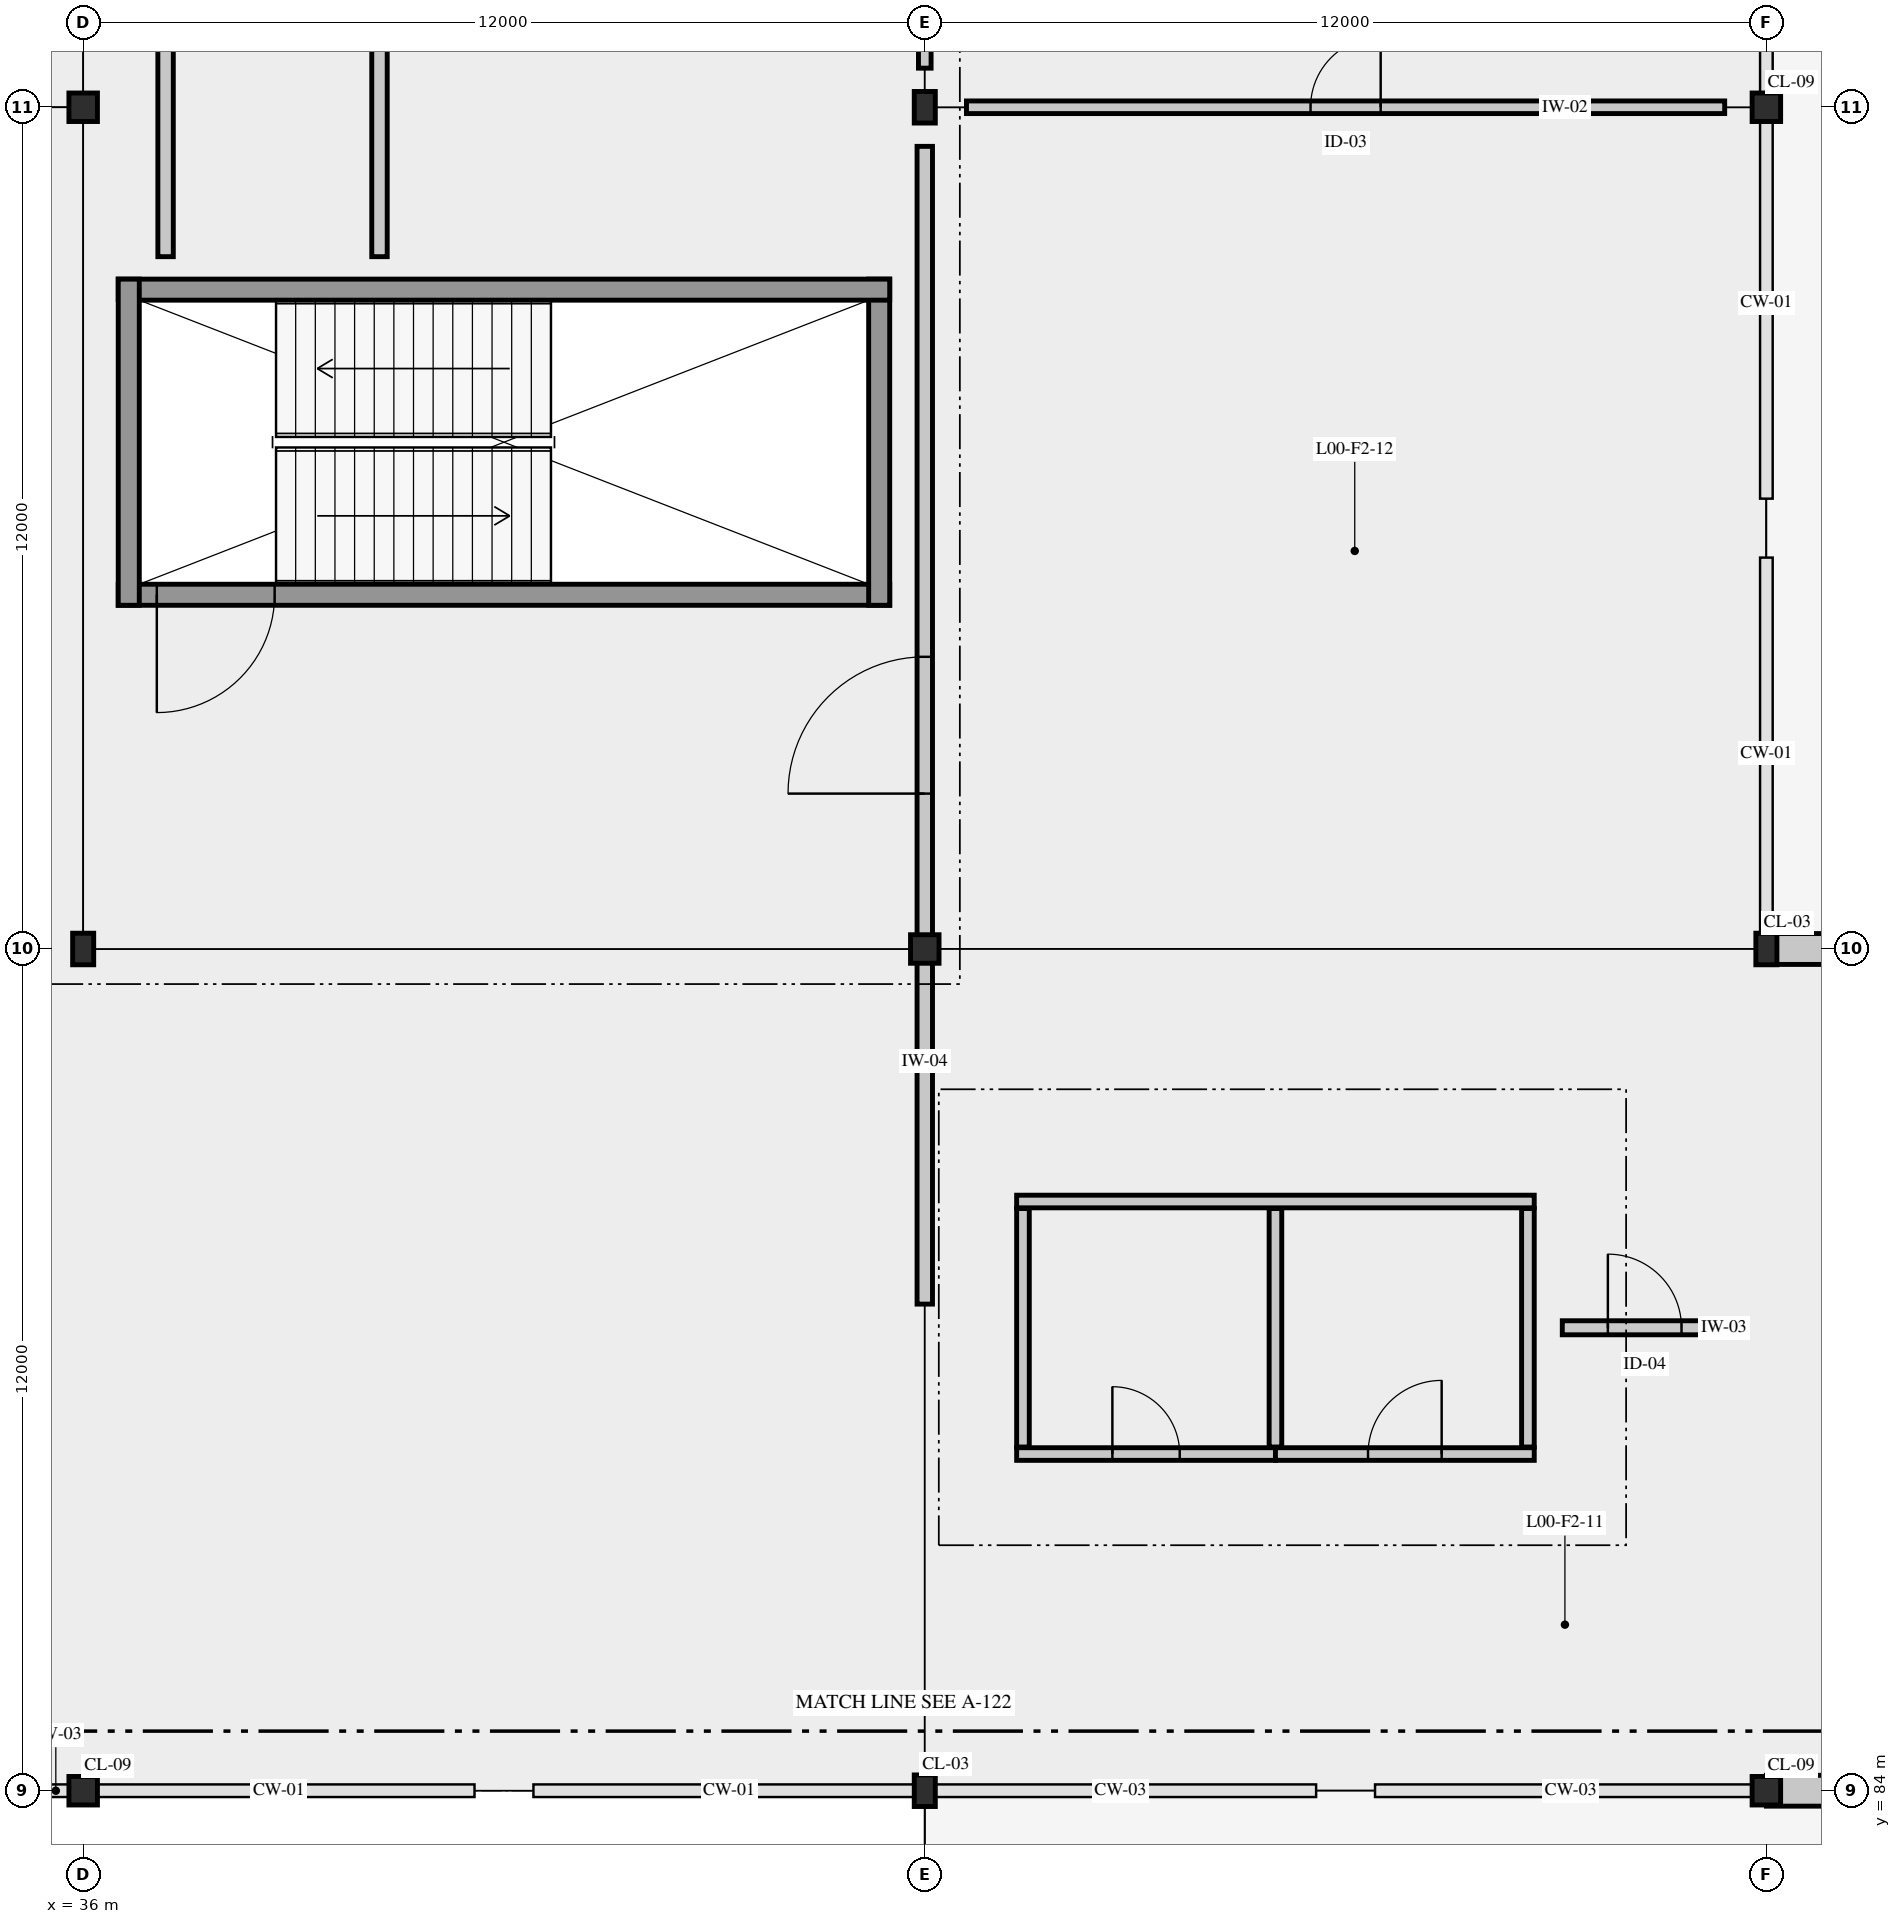
"""IFC4 building model, lengths in metres.
Left out: names, types, materials, properties, quantities, classifications, styles, units other than length and angle.
Written with IfcOpenShell. Run it as: python <this file> out.ifc"""

import sys

from ifc_helpers import new_model, si_unit, direction, frame, frame_2d, origin, origin_2d, place, context, subcontext, project, spatial, rectangle, hollow_circle, i_section, extrude, element, fill, save


model = new_model("IFC4")
c1 = context("Model", 3, precision=1e-05, world=origin(), true_north=direction((0.0, 1.0)))
c2 = subcontext(c1, "Body", "Model", "MODEL_VIEW")
j1 = project(units=[si_unit("LENGTHUNIT", "METRE"), si_unit("PLANEANGLEUNIT", "RADIAN")], contexts=[c1])
p1 = place(None, origin())
s1 = spatial("IfcSite", under=j1, at=p1, CompositionType="ELEMENT")
p2 = place(p1, origin())
s2 = spatial("IfcBuilding", under=s1, at=p2, CompositionType="ELEMENT")
p3 = place(p2, origin())
s3 = spatial("IfcBuildingStorey", under=s2, at=p3, CompositionType="ELEMENT", Elevation=0.0)
p4 = place(p3, frame((36.0, 84.0, 0.0), z_axis=(0.0, 0.0, 1.0), x_axis=(1.0, 0.0, 0.0)))
e1 = element("IfcColumn", 1, at=p4, inside=s3, PredefinedType="COLUMN", context=c2, shape_type="SweptSolid", body=[
    extrude(hollow_circle(Radius=0.203, WallThickness=0.016, at=origin_2d()), origin(), (0.0, 0.0, 1.0), 5.4),
])
p5 = place(p3, frame((36.0, 96.0, 0.0), z_axis=(0.0, 0.0, 1.0), x_axis=(1.0, 0.0, 0.0)))
e2 = element("IfcColumn", 2, at=p5, inside=s3, PredefinedType="COLUMN", context=c2, shape_type="SweptSolid", body=[
    extrude(i_section(OverallWidth=0.3, OverallDepth=0.45, WebThickness=0.014, FlangeThickness=0.026, FilletRadius=0.027, at=origin_2d()), origin(), (0.0, 0.0, 1.0), 5.4),
])
p6 = place(p3, frame((36.0, 108.0, 0.0), z_axis=(0.0, 0.0, 1.0), x_axis=(1.0, 0.0, 0.0)))
e3 = element("IfcColumn", 3, at=p6, inside=s3, PredefinedType="COLUMN", context=c2, shape_type="SweptSolid", body=[
    extrude(hollow_circle(Radius=0.203, WallThickness=0.016, at=origin_2d()), origin(), (0.0, 0.0, 1.0), 5.4),
])
p7 = place(p3, frame((48.0, 84.0, 0.0), z_axis=(0.0, 0.0, 1.0), x_axis=(1.0, 0.0, 0.0)))
e4 = element("IfcColumn", 4, at=p7, inside=s3, PredefinedType="COLUMN", context=c2, shape_type="SweptSolid", body=[
    extrude(i_section(OverallWidth=0.3, OverallDepth=0.45, WebThickness=0.014, FlangeThickness=0.026, FilletRadius=0.027, at=origin_2d()), origin(), (0.0, 0.0, 1.0), 5.4),
])
p8 = place(p3, frame((48.0, 96.0, 0.0), z_axis=(0.0, 0.0, 1.0), x_axis=(1.0, 0.0, 0.0)))
e5 = element("IfcColumn", 5, at=p8, inside=s3, PredefinedType="COLUMN", context=c2, shape_type="SweptSolid", body=[
    extrude(hollow_circle(Radius=0.203, WallThickness=0.016, at=origin_2d()), origin(), (0.0, 0.0, 1.0), 5.4),
])
p9 = place(p3, frame((48.0, 108.0, 0.0), z_axis=(0.0, 0.0, 1.0), x_axis=(1.0, 0.0, 0.0)))
e6 = element("IfcColumn", 6, at=p9, inside=s3, PredefinedType="COLUMN", context=c2, shape_type="SweptSolid", body=[
    extrude(i_section(OverallWidth=0.3, OverallDepth=0.45, WebThickness=0.014, FlangeThickness=0.026, FilletRadius=0.027, at=origin_2d()), origin(), (0.0, 0.0, 1.0), 5.4),
])
p10 = place(p3, frame((60.0, 84.0, 0.0), z_axis=(0.0, 0.0, 1.0), x_axis=(1.0, 0.0, 0.0)))
e7 = element("IfcColumn", 7, at=p10, inside=s3, PredefinedType="COLUMN", context=c2, shape_type="SweptSolid", body=[
    extrude(hollow_circle(Radius=0.203, WallThickness=0.016, at=origin_2d()), origin(), (0.0, 0.0, 1.0), 5.4),
])
p11 = place(p3, frame((60.0, 96.0, 0.0), z_axis=(0.0, 0.0, 1.0), x_axis=(1.0, 0.0, 0.0)))
e8 = element("IfcColumn", 8, at=p11, inside=s3, PredefinedType="COLUMN", context=c2, shape_type="SweptSolid", body=[
    extrude(i_section(OverallWidth=0.3, OverallDepth=0.45, WebThickness=0.014, FlangeThickness=0.026, FilletRadius=0.027, at=origin_2d()), origin(), (0.0, 0.0, 1.0), 5.4),
])
p12 = place(p3, frame((60.0, 108.0, 0.0), z_axis=(0.0, 0.0, 1.0), x_axis=(1.0, 0.0, 0.0)))
e9 = element("IfcColumn", 9, at=p12, inside=s3, PredefinedType="COLUMN", context=c2, shape_type="SweptSolid", body=[
    extrude(hollow_circle(Radius=0.203, WallThickness=0.016, at=origin_2d()), origin(), (0.0, 0.0, 1.0), 5.4),
])
p13 = place(p3, frame((60.0, 84.0, 0.0), z_axis=(0.0, 0.0, 1.0), x_axis=(1.0, 0.0, 0.0)))
e10 = element("IfcWall", 10, at=p13, inside=s3, PredefinedType="SOLIDWALL", context=c2, shape_type="SweptSolid", body=[
    extrude(rectangle(XDim=12.0, YDim=0.44, at=frame_2d((6.0, 0.0))), origin(), (0.0, 0.0, 1.0), 4.52),
])
p14 = place(p13, frame((1.96, 0.0, 0.0)))
e11 = element("IfcOpeningElement", 11, at=p14, cuts=e10, PredefinedType="OPENING", context=c2, shape_type="SweptSolid", body=[
    extrude(rectangle(XDim=2.8, YDim=2.8, at=frame_2d((1.4, 1.4))), frame((0.0, 0.23, 0.0), z_axis=(0.0, -1.0, 0.0), x_axis=(1.0, 0.0, 0.0)), (0.0, 0.0, 1.0), 0.46),
])
p15 = place(p13, frame((7.44, 0.0, 0.0)))
e12 = element("IfcOpeningElement", 12, at=p15, cuts=e10, PredefinedType="OPENING", context=c2, shape_type="SweptSolid", body=[
    extrude(rectangle(XDim=2.4, YDim=2.6, at=frame_2d((1.2, 1.3))), frame((0.0, 0.23, 0.0), z_axis=(0.0, -1.0, 0.0), x_axis=(1.0, 0.0, 0.0)), (0.0, 0.0, 1.0), 0.46),
])
p16 = place(p3, frame((72.0, 96.0, 0.0), z_axis=(0.0, 0.0, 1.0), x_axis=(-1.0, 0.0, 0.0)))
e13 = element("IfcWall", 13, at=p16, inside=s3, PredefinedType="SOLIDWALL", context=c2, shape_type="SweptSolid", body=[
    extrude(rectangle(XDim=12.0, YDim=0.44, at=frame_2d((6.0, 0.0))), origin(), (0.0, 0.0, 1.0), 4.52),
])
p17 = place(p16, frame((1.96, 0.0, 0.0)))
e14 = element("IfcOpeningElement", 14, at=p17, cuts=e13, PredefinedType="OPENING", context=c2, shape_type="SweptSolid", body=[
    extrude(rectangle(XDim=2.8, YDim=2.8, at=frame_2d((1.4, 1.4))), frame((0.0, 0.23, 0.0), z_axis=(0.0, -1.0, 0.0), x_axis=(1.0, 0.0, 0.0)), (0.0, 0.0, 1.0), 0.46),
])
p18 = place(p16, frame((7.44, 0.0, 0.0)))
e15 = element("IfcOpeningElement", 15, at=p18, cuts=e13, PredefinedType="OPENING", context=c2, shape_type="SweptSolid", body=[
    extrude(rectangle(XDim=2.4, YDim=2.6, at=frame_2d((1.2, 1.3))), frame((0.0, 0.23, 0.0), z_axis=(0.0, -1.0, 0.0), x_axis=(1.0, 0.0, 0.0)), (0.0, 0.0, 1.0), 0.46),
])
p19 = place(p3, frame((36.5, 101.05, 0.0), z_axis=(0.0, 0.0, 1.0), x_axis=(1.0, 0.0, 0.0)))
e16 = element("IfcWall", 16, at=p19, inside=s3, PredefinedType="SHEAR", context=c2, shape_type="SweptSolid", body=[
    extrude(rectangle(XDim=11.0, YDim=0.3, at=frame_2d((5.5, 0.0))), origin(), (0.0, 0.0, 1.0), 5.14),
])
p20 = place(p19, frame((0.55, 0.0, 0.0)))
e17 = element("IfcOpeningElement", 17, at=p20, cuts=e16, PredefinedType="OPENING", context=c2, shape_type="SweptSolid", body=[
    extrude(rectangle(XDim=1.68, YDim=2.35, at=frame_2d((0.84, 1.175))), frame((0.0, 0.16, 0.0), z_axis=(0.0, -1.0, 0.0), x_axis=(1.0, 0.0, 0.0)), (0.0, 0.0, 1.0), 0.32),
])
p21 = place(p3, frame((47.35, 100.9, 0.0), z_axis=(0.0, 0.0, 1.0), x_axis=(0.0, 1.0, 0.0)))
e18 = element("IfcWall", 18, at=p21, inside=s3, PredefinedType="SHEAR", context=c2, shape_type="SweptSolid", body=[
    extrude(rectangle(XDim=4.65, YDim=0.3, at=frame_2d((2.325, 0.0))), origin(), (0.0, 0.0, 1.0), 5.14),
])
p22 = place(p3, frame((47.5, 105.4, 0.0), z_axis=(0.0, 0.0, 1.0), x_axis=(-1.0, 0.0, 0.0)))
e19 = element("IfcWall", 19, at=p22, inside=s3, PredefinedType="SHEAR", context=c2, shape_type="SweptSolid", body=[
    extrude(rectangle(XDim=11.0, YDim=0.3, at=frame_2d((5.5, 0.0))), origin(), (0.0, 0.0, 1.0), 5.14),
])
p23 = place(p3, frame((36.65, 105.55, 0.0), z_axis=(0.0, 0.0, 1.0), x_axis=(0.0, -1.0, 0.0)))
e20 = element("IfcWall", 20, at=p23, inside=s3, PredefinedType="SHEAR", context=c2, shape_type="SweptSolid", body=[
    extrude(rectangle(XDim=4.65, YDim=0.3, at=frame_2d((2.325, 0.0))), origin(), (0.0, 0.0, 1.0), 5.14),
])
p24 = place(p3, frame((49.31, 92.4, 0.0), z_axis=(0.0, 0.0, 1.0), x_axis=(1.0, 0.0, 0.0)))
e21 = element("IfcWall", 21, at=p24, inside=s3, PredefinedType="PARTITIONING", context=c2, shape_type="SweptSolid", body=[
    extrude(rectangle(XDim=7.38, YDim=0.18, at=frame_2d((3.69, 0.0))), origin(), (0.0, 0.0, 1.0), 4.67),
])
p25 = place(p3, frame((49.31, 88.8, 0.0), z_axis=(0.0, 0.0, 1.0), x_axis=(1.0, 0.0, 0.0)))
e22 = element("IfcWall", 22, at=p25, inside=s3, PredefinedType="PARTITIONING", context=c2, shape_type="SweptSolid", body=[
    extrude(rectangle(XDim=3.69, YDim=0.18, at=frame_2d((1.845, 0.0))), origin(), (0.0, 0.0, 1.0), 4.67),
])
p26 = place(p25, frame((1.365, 0.0, 0.0)))
e23 = element("IfcOpeningElement", 23, at=p26, cuts=e22, PredefinedType="OPENING", context=c2, shape_type="SweptSolid", body=[
    extrude(rectangle(XDim=0.96, YDim=2.15, at=frame_2d((0.48, 1.075))), frame((0.0, 0.1, 0.0), z_axis=(0.0, -1.0, 0.0), x_axis=(1.0, 0.0, 0.0)), (0.0, 0.0, 1.0), 0.2),
])
p27 = place(p3, frame((53.0, 88.8, 0.0), z_axis=(0.0, 0.0, 1.0), x_axis=(1.0, 0.0, 0.0)))
e24 = element("IfcWall", 24, at=p27, inside=s3, PredefinedType="PARTITIONING", context=c2, shape_type="SweptSolid", body=[
    extrude(rectangle(XDim=3.69, YDim=0.18, at=frame_2d((1.845, 0.0))), origin(), (0.0, 0.0, 1.0), 4.67),
])
p28 = place(p27, frame((1.32, 0.0, 0.0)))
e25 = element("IfcOpeningElement", 25, at=p28, cuts=e24, PredefinedType="OPENING", context=c2, shape_type="SweptSolid", body=[
    extrude(rectangle(XDim=1.05, YDim=2.2, at=frame_2d((0.525, 1.1))), frame((0.0, 0.1, 0.0), z_axis=(0.0, -1.0, 0.0), x_axis=(1.0, 0.0, 0.0)), (0.0, 0.0, 1.0), 0.2),
])
for number, where, z_axis, x_axis in (
    (26, (49.4, 88.9, 0.0), (0.0, 0.0, 1.0), (0.0, 1.0, 0.0)),
    (27, (56.6, 88.9, 0.0), (0.0, 0.0, 1.0), (0.0, 1.0, 0.0)),
    (28, (53.0, 88.9, 0.0), (0.0, 0.0, 1.0), (0.0, 1.0, 0.0)),
):
    element("IfcWall", number, at=place(p3, frame(where, z_axis=z_axis, x_axis=x_axis)), inside=s3, PredefinedType="PARTITIONING", context=c2, shape_type="SweptSolid", body=[
        extrude(rectangle(XDim=3.4, YDim=0.18, at=frame_2d((1.7, 0.0))), origin(), (0.0, 0.0, 1.0), 4.67),
    ])
p29 = place(p3, frame((37.175, 105.87, 0.0), z_axis=(0.0, 0.0, 1.0), x_axis=(0.0, 1.0, 0.0)))
e29 = element("IfcWall", 29, at=p29, inside=s3, PredefinedType="PARTITIONING", context=c2, shape_type="SweptSolid", body=[
    extrude(rectangle(XDim=13.77, YDim=0.22, at=frame_2d((6.885, 0.0))), origin(), (0.0, 0.0, 1.0), 4.53),
])
p30 = place(p29, frame((7.762, 0.0, 0.0)))
e30 = element("IfcOpeningElement", 30, at=p30, cuts=e29, PredefinedType="OPENING", context=c2, shape_type="SweptSolid", body=[
    extrude(rectangle(XDim=1.0, YDim=2.2, at=frame_2d((0.5, 1.1))), frame((0.0, 0.12, 0.0), z_axis=(0.0, -1.0, 0.0), x_axis=(1.0, 0.0, 0.0)), (0.0, 0.0, 1.0), 0.24),
])
p31 = place(p3, frame((40.225, 105.87, 0.0), z_axis=(0.0, 0.0, 1.0), x_axis=(0.0, 1.0, 0.0)))
e31 = element("IfcWall", 31, at=p31, inside=s3, PredefinedType="PARTITIONING", context=c2, shape_type="SweptSolid", body=[
    extrude(rectangle(XDim=13.77, YDim=0.22, at=frame_2d((6.885, 0.0))), origin(), (0.0, 0.0, 1.0), 4.53),
])
p32 = place(p3, frame((48.0, 108.557, 0.0), z_axis=(0.0, 0.0, 1.0), x_axis=(0.0, 1.0, 0.0)))
e32 = element("IfcWall", 32, at=p32, inside=s3, PredefinedType="PARTITIONING", context=c2, shape_type="SweptSolid", body=[
    extrude(rectangle(XDim=10.848, YDim=0.18, at=frame_2d((5.424, 0.0))), origin(), (0.0, 0.0, 1.0), 4.63),
])
p33 = place(p32, frame((4.599, 0.0, 0.0)))
e33 = element("IfcOpeningElement", 33, at=p33, cuts=e32, PredefinedType="OPENING", context=c2, shape_type="SweptSolid", body=[
    extrude(rectangle(XDim=1.65, YDim=2.35, at=frame_2d((0.825, 1.175))), frame((0.0, 0.1, 0.0), z_axis=(0.0, -1.0, 0.0), x_axis=(1.0, 0.0, 0.0)), (0.0, 0.0, 1.0), 0.2),
])
p34 = place(p3, frame((48.0, 90.938, 0.0), z_axis=(0.0, 0.0, 1.0), x_axis=(0.0, 1.0, 0.0)))
e34 = element("IfcWall", 34, at=p34, inside=s3, PredefinedType="PARTITIONING", context=c2, shape_type="SweptSolid", body=[
    extrude(rectangle(XDim=16.505, YDim=0.22, at=frame_2d((8.252, 0.0))), origin(), (0.0, 0.0, 1.0), 4.53),
])
p35 = place(p34, frame((7.278, 0.0, 0.0)))
e35 = element("IfcOpeningElement", 35, at=p35, cuts=e34, PredefinedType="OPENING", context=c2, shape_type="SweptSolid", body=[
    extrude(rectangle(XDim=1.95, YDim=2.45, at=frame_2d((0.975, 1.225))), frame((0.0, 0.12, 0.0), z_axis=(0.0, -1.0, 0.0), x_axis=(1.0, 0.0, 0.0)), (0.0, 0.0, 1.0), 0.24),
])
p36 = place(p3, frame((48.594, 108.0, 0.0), z_axis=(0.0, 0.0, 1.0), x_axis=(1.0, 0.0, 0.0)))
e36 = element("IfcWall", 36, at=p36, inside=s3, PredefinedType="PARTITIONING", context=c2, shape_type="SweptSolid", body=[
    extrude(rectangle(XDim=10.811, YDim=0.18, at=frame_2d((5.406, 0.0))), origin(), (0.0, 0.0, 1.0), 4.53),
])
p37 = place(p36, frame((4.906, 0.0, 0.0)))
e37 = element("IfcOpeningElement", 37, at=p37, cuts=e36, PredefinedType="OPENING", context=c2, shape_type="SweptSolid", body=[
    extrude(rectangle(XDim=1.0, YDim=2.2, at=frame_2d((0.5, 1.1))), frame((0.0, 0.1, 0.0), z_axis=(0.0, -1.0, 0.0), x_axis=(1.0, 0.0, 0.0)), (0.0, 0.0, 1.0), 0.2),
])
p38 = place(p3, frame((57.09, 90.6, 0.0), z_axis=(0.0, 0.0, 1.0), x_axis=(1.0, 0.0, 0.0)))
e38 = element("IfcWall", 38, at=p38, inside=s3, PredefinedType="PARTITIONING", context=c2, shape_type="SweptSolid", body=[
    extrude(rectangle(XDim=2.46, YDim=0.2, at=frame_2d((1.23, 0.0))), origin(), (0.0, 0.0, 1.0), 4.67),
])
p39 = place(p38, frame((0.65, 0.0, 0.0)))
e39 = element("IfcOpeningElement", 39, at=p39, cuts=e38, PredefinedType="OPENING", context=c2, shape_type="SweptSolid", body=[
    extrude(rectangle(XDim=1.05, YDim=2.2, at=frame_2d((0.525, 1.1))), frame((0.0, 0.11, 0.0), z_axis=(0.0, -1.0, 0.0), x_axis=(1.0, 0.0, 0.0)), (0.0, 0.0, 1.0), 0.22),
])
p40 = place(p20, frame((1.68, 0.0, 0.0), z_axis=(0.0, 0.0, 1.0), x_axis=(-1.0, 0.0, 0.0)))
e40 = element("IfcDoor", 40, at=p40, inside=s3, OperationType="DOUBLE_DOOR_SINGLE_SWING", PredefinedType="DOOR", context=c2, shape_type="SweptSolid", body=[
    extrude(rectangle(XDim=1.68, YDim=2.35, at=frame_2d((0.84, 1.175))), frame((0.0, 0.025, 0.0), z_axis=(0.0, -1.0, 0.0), x_axis=(1.0, 0.0, 0.0)), (0.0, 0.0, 1.0), 0.05),
])
fill(e17, e40)
p41 = place(p26, origin())
e41 = element("IfcDoor", 41, at=p41, inside=s3, OperationType="SINGLE_SWING_LEFT", PredefinedType="DOOR", context=c2, shape_type="SweptSolid", body=[
    extrude(rectangle(XDim=0.96, YDim=2.15, at=frame_2d((0.48, 1.075))), frame((0.0, 0.025, 0.0), z_axis=(0.0, -1.0, 0.0), x_axis=(1.0, 0.0, 0.0)), (0.0, 0.0, 1.0), 0.05),
])
fill(e23, e41)
p42 = place(p28, origin())
e42 = element("IfcDoor", 42, at=p42, inside=s3, OperationType="SINGLE_SWING_RIGHT", PredefinedType="DOOR", context=c2, shape_type="SweptSolid", body=[
    extrude(rectangle(XDim=1.05, YDim=2.2, at=frame_2d((0.525, 1.1))), frame((0.0, 0.025, 0.0), z_axis=(0.0, -1.0, 0.0), x_axis=(1.0, 0.0, 0.0)), (0.0, 0.0, 1.0), 0.05),
])
fill(e25, e42)
p43 = place(p35, origin())
e43 = element("IfcDoor", 43, at=p43, inside=s3, OperationType="DOUBLE_DOOR_SINGLE_SWING", PredefinedType="DOOR", context=c2, shape_type="SweptSolid", body=[
    extrude(rectangle(XDim=1.95, YDim=2.45, at=frame_2d((0.975, 1.225))), frame((0.0, 0.025, 0.0), z_axis=(0.0, -1.0, 0.0), x_axis=(1.0, 0.0, 0.0)), (0.0, 0.0, 1.0), 0.05),
])
fill(e35, e43)
p44 = place(p37, origin())
e44 = element("IfcDoor", 44, at=p44, inside=s3, OperationType="SINGLE_SWING_RIGHT", PredefinedType="DOOR", context=c2, shape_type="SweptSolid", body=[
    extrude(rectangle(XDim=1.0, YDim=2.2, at=frame_2d((0.5, 1.1))), frame((0.0, 0.025, 0.0), z_axis=(0.0, -1.0, 0.0), x_axis=(1.0, 0.0, 0.0)), (0.0, 0.0, 1.0), 0.05),
])
fill(e37, e44)
p45 = place(p39, origin())
e45 = element("IfcDoor", 45, at=p45, inside=s3, OperationType="SINGLE_SWING_LEFT", PredefinedType="DOOR", context=c2, shape_type="SweptSolid", body=[
    extrude(rectangle(XDim=1.05, YDim=2.2, at=frame_2d((0.525, 1.1))), frame((0.0, 0.025, 0.0), z_axis=(0.0, -1.0, 0.0), x_axis=(1.0, 0.0, 0.0)), (0.0, 0.0, 1.0), 0.05),
])
fill(e39, e45)
save(model, sys.argv[1])
